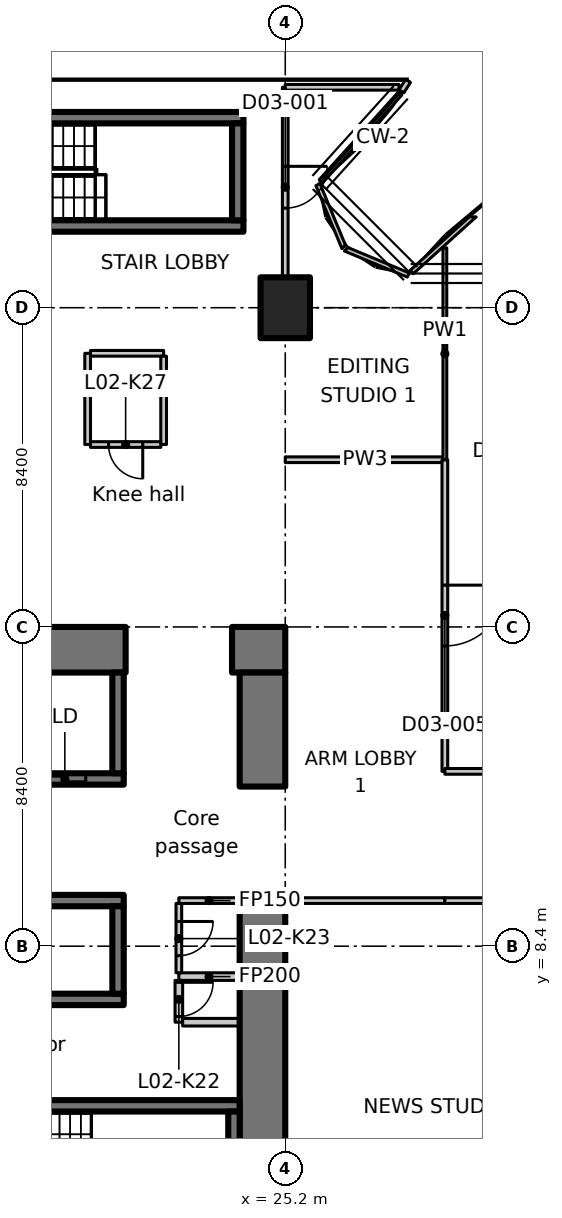
"""IFC4 building model, lengths in metres.
Left out: names, types, materials, properties, quantities, classifications, styles, units other than length and angle.
Written with IfcOpenShell. Run it as: python <this file> out.ifc"""

import sys

from ifc_helpers import new_model, si_unit, direction, frame, frame_2d, origin, origin_2d, place, context, subcontext, project, spatial, polyline, rectangle, outline, extrude, element, fill, save


model = new_model("IFC4")
c1 = context("Model", 3, precision=1e-05, world=origin(), true_north=direction((0.0, 1.0)))
c2 = subcontext(c1, "Body", "Model", "MODEL_VIEW")
j1 = project(units=[si_unit("LENGTHUNIT", "METRE"), si_unit("PLANEANGLEUNIT", "RADIAN")], contexts=[c1])
p1 = place(None, origin())
s1 = spatial("IfcSite", under=j1, at=p1, CompositionType="ELEMENT")
p2 = place(p1, origin())
s2 = spatial("IfcBuilding", under=s1, at=p2, CompositionType="ELEMENT")
p3 = place(p2, frame((0.0, 0.0, 12.5)))
s3 = spatial("IfcBuildingStorey", under=s2, at=p3, CompositionType="ELEMENT", Elevation=12.5)
p4 = place(p3, frame((25.2, 25.2, 0.0), z_axis=(0.0, 0.0, 1.0), x_axis=(1.0, 0.0, 0.0)))
e1 = element("IfcColumn", 1, at=p4, inside=s3, PredefinedType="COLUMN", context=c2, shape_type="SweptSolid", body=[
    extrude(rectangle(XDim=1.3, YDim=1.6, at=origin_2d()), origin(), (0.0, 0.0, 1.0), 7.25),
])
p5 = place(p2, origin())
s4 = spatial("IfcBuildingStorey", under=s2, at=p5, CompositionType="ELEMENT", Elevation=0.0)
p6 = place(p5, frame((17.4, 32.4, -6.3), z_axis=(0.0, 0.0, 1.0), x_axis=(1.0, 0.0, 0.0)))
e2 = element("IfcWall", 2, at=p6, inside=s4, PredefinedType="SOLIDWALL", context=c2, shape_type="SweptSolid", body=[
    extrude(rectangle(XDim=7.2, YDim=2.4, at=frame_2d((3.6, 0.0))), origin(), (0.0, 0.0, 1.0), 42.55),
])
p7 = place(p3, origin())
e3 = element("IfcWall", 3, at=p7, inside=s3, PredefinedType="SOLIDWALL", context=c2, shape_type="SweptSolid", body=[
    extrude(outline(polyline([(30.224, 27.59), (30.045, 27.59), (28.487, 26.182), (28.567, 26.093), (30.224, 27.59)])), origin(), (0.0, 0.0, 1.0), 7.5),
])
p8 = place(p3, origin())
e4 = element("IfcWall", 4, at=p8, inside=s3, PredefinedType="SOLIDWALL", context=c2, shape_type="SweptSolid", body=[
    extrude(outline(polyline([(28.412, 26.005), (28.458, 26.116), (26.847, 26.783), (26.755, 26.692), (28.412, 26.005)])), origin(), (0.0, 0.0, 1.0), 7.5),
])
p9 = place(p3, origin())
e5 = element("IfcWall", 5, at=p9, inside=s3, PredefinedType="SOLIDWALL", context=c2, shape_type="SweptSolid", body=[
    extrude(outline(polyline([(26.692, 26.755), (26.783, 26.847), (26.116, 28.458), (26.005, 28.412), (26.692, 26.755)])), origin(), (0.0, 0.0, 1.0), 7.5),
])
p10 = place(p3, origin())
e6 = element("IfcWall", 6, at=p10, inside=s3, PredefinedType="SOLIDWALL", context=c2, shape_type="SweptSolid", body=[
    extrude(outline(polyline([(26.093, 28.567), (26.182, 28.487), (28.267, 30.795), (28.167, 30.862), (26.093, 28.567)])), origin(), (0.0, 0.0, 1.0), 7.5),
])
p11 = place(p3, frame((-1.1, 16.2, 0.0), z_axis=(0.0, 0.0, 1.0), x_axis=(1.0, 0.0, 0.0)))
e7 = element("IfcWall", 7, at=p11, inside=s3, PredefinedType="SHEAR", context=c2, shape_type="SweptSolid", body=[
    extrude(rectangle(XDim=22.1, YDim=1.2, at=frame_2d((11.05, 0.0))), origin(), (0.0, 0.0, 1.0), 7.25),
])
p12 = place(p11, frame((3.15, 0.0, 0.0)))
e8 = element("IfcOpeningElement", 8, at=p12, cuts=e7, PredefinedType="OPENING", context=c2, shape_type="SweptSolid", body=[
    extrude(rectangle(XDim=1.1, YDim=2.3, at=frame_2d((0.55, 1.15))), frame((0.0, 0.61, 0.0), z_axis=(0.0, -1.0, 0.0), x_axis=(1.0, 0.0, 0.0)), (0.0, 0.0, 1.0), 1.22),
])
p13 = place(p3, frame((23.8, 16.2, 0.0), z_axis=(0.0, 0.0, 1.0), x_axis=(1.0, 0.0, 0.0)))
e9 = element("IfcWall", 9, at=p13, inside=s3, PredefinedType="SHEAR", context=c2, shape_type="SweptSolid", body=[
    extrude(rectangle(XDim=1.4, YDim=1.2, at=frame_2d((0.7, 0.0))), origin(), (0.0, 0.0, 1.0), 7.25),
])
p14 = place(p3, frame((24.6, 1.2, 0.0), z_axis=(0.0, 0.0, 1.0), x_axis=(0.0, 1.0, 0.0)))
e10 = element("IfcWall", 10, at=p14, inside=s3, PredefinedType="SHEAR", context=c2, shape_type="SweptSolid", body=[
    extrude(rectangle(XDim=8.6, YDim=1.2, at=frame_2d((4.3, 0.0))), origin(), (0.0, 0.0, 1.0), 7.25),
])
p15 = place(p3, frame((24.6, 12.6, 0.0), z_axis=(0.0, 0.0, 1.0), x_axis=(0.0, 1.0, 0.0)))
e11 = element("IfcWall", 11, at=p15, inside=s3, PredefinedType="SHEAR", context=c2, shape_type="SweptSolid", body=[
    extrude(rectangle(XDim=3.0, YDim=1.2, at=frame_2d((1.5, 0.0))), origin(), (0.0, 0.0, 1.0), 7.25),
])
p16 = place(p3, frame((1.2, 7.0, 0.0), z_axis=(0.0, 0.0, 1.0), x_axis=(1.0, 0.0, 0.0)))
e12 = element("IfcWall", 12, at=p16, inside=s3, PredefinedType="SHEAR", context=c2, shape_type="SweptSolid", body=[
    extrude(rectangle(XDim=19.75, YDim=0.3, at=frame_2d((9.875, 0.0))), origin(), (0.0, 0.0, 1.0), 7.25),
])
p17 = place(p3, frame((1.2, 9.6, 0.0), z_axis=(0.0, 0.0, 1.0), x_axis=(1.0, 0.0, 0.0)))
e13 = element("IfcWall", 13, at=p17, inside=s3, PredefinedType="SHEAR", context=c2, shape_type="SweptSolid", body=[
    extrude(rectangle(XDim=19.75, YDim=0.3, at=frame_2d((9.875, 0.0))), origin(), (0.0, 0.0, 1.0), 7.25),
])
p18 = place(p17, frame((0.85, 0.0, 0.0)))
e14 = element("IfcOpeningElement", 14, at=p18, cuts=e13, PredefinedType="OPENING", context=c2, shape_type="SweptSolid", body=[
    extrude(rectangle(XDim=1.1, YDim=2.3, at=frame_2d((0.55, 1.15))), frame((0.0, 0.16, 0.0), z_axis=(0.0, -1.0, 0.0), x_axis=(1.0, 0.0, 0.0)), (0.0, 0.0, 1.0), 0.32),
])
p19 = place(p17, frame((3.65, 0.0, 0.0)))
e15 = element("IfcOpeningElement", 15, at=p19, cuts=e13, PredefinedType="OPENING", context=c2, shape_type="SweptSolid", body=[
    extrude(rectangle(XDim=1.1, YDim=2.3, at=frame_2d((0.55, 1.15))), frame((0.0, 0.16, 0.0), z_axis=(0.0, -1.0, 0.0), x_axis=(1.0, 0.0, 0.0)), (0.0, 0.0, 1.0), 0.32),
])
p20 = place(p17, frame((6.45, 0.0, 0.0)))
e16 = element("IfcOpeningElement", 16, at=p20, cuts=e13, PredefinedType="OPENING", context=c2, shape_type="SweptSolid", body=[
    extrude(rectangle(XDim=1.1, YDim=2.3, at=frame_2d((0.55, 1.15))), frame((0.0, 0.16, 0.0), z_axis=(0.0, -1.0, 0.0), x_axis=(1.0, 0.0, 0.0)), (0.0, 0.0, 1.0), 0.32),
])
p21 = place(p17, frame((9.25, 0.0, 0.0)))
e17 = element("IfcOpeningElement", 17, at=p21, cuts=e13, PredefinedType="OPENING", context=c2, shape_type="SweptSolid", body=[
    extrude(rectangle(XDim=1.1, YDim=2.3, at=frame_2d((0.55, 1.15))), frame((0.0, 0.16, 0.0), z_axis=(0.0, -1.0, 0.0), x_axis=(1.0, 0.0, 0.0)), (0.0, 0.0, 1.0), 0.32),
])
p22 = place(p17, frame((12.05, 0.0, 0.0)))
e18 = element("IfcOpeningElement", 18, at=p22, cuts=e13, PredefinedType="OPENING", context=c2, shape_type="SweptSolid", body=[
    extrude(rectangle(XDim=1.1, YDim=2.3, at=frame_2d((0.55, 1.15))), frame((0.0, 0.16, 0.0), z_axis=(0.0, -1.0, 0.0), x_axis=(1.0, 0.0, 0.0)), (0.0, 0.0, 1.0), 0.32),
])
p23 = place(p17, frame((14.85, 0.0, 0.0)))
e19 = element("IfcOpeningElement", 19, at=p23, cuts=e13, PredefinedType="OPENING", context=c2, shape_type="SweptSolid", body=[
    extrude(rectangle(XDim=1.1, YDim=2.3, at=frame_2d((0.55, 1.15))), frame((0.0, 0.16, 0.0), z_axis=(0.0, -1.0, 0.0), x_axis=(1.0, 0.0, 0.0)), (0.0, 0.0, 1.0), 0.32),
])
p24 = place(p3, frame((20.8, 7.15, 0.0), z_axis=(0.0, 0.0, 1.0), x_axis=(0.0, 1.0, 0.0)))
e20 = element("IfcWall", 20, at=p24, inside=s3, PredefinedType="SHEAR", context=c2, shape_type="SweptSolid", body=[
    extrude(rectangle(XDim=2.3, YDim=0.3, at=frame_2d((1.15, 0.0))), origin(), (0.0, 0.0, 1.0), 7.25),
])
p25 = place(p3, frame((15.05, 12.8, 0.0), z_axis=(0.0, 0.0, 1.0), x_axis=(1.0, 0.0, 0.0)))
e21 = element("IfcWall", 21, at=p25, inside=s3, PredefinedType="SHEAR", context=c2, shape_type="SweptSolid", body=[
    extrude(rectangle(XDim=5.9, YDim=0.3, at=frame_2d((2.95, 0.0))), origin(), (0.0, 0.0, 1.0), 7.25),
])
p26 = place(p25, frame((3.8, 0.0, 0.0)))
e22 = element("IfcOpeningElement", 22, at=p26, cuts=e21, PredefinedType="OPENING", context=c2, shape_type="SweptSolid", body=[
    extrude(rectangle(XDim=1.1, YDim=2.3, at=frame_2d((0.55, 1.15))), frame((0.0, 0.16, 0.0), z_axis=(0.0, -1.0, 0.0), x_axis=(1.0, 0.0, 0.0)), (0.0, 0.0, 1.0), 0.32),
])
p27 = place(p3, frame((20.8, 12.95, 0.0), z_axis=(0.0, 0.0, 1.0), x_axis=(0.0, 1.0, 0.0)))
e23 = element("IfcWall", 23, at=p27, inside=s3, PredefinedType="SHEAR", context=c2, shape_type="SweptSolid", body=[
    extrude(rectangle(XDim=2.65, YDim=0.3, at=frame_2d((1.325, 0.0))), origin(), (0.0, 0.0, 1.0), 7.25),
])
p28 = place(p3, frame((15.8, 4.2, 0.0), z_axis=(0.0, 0.0, 1.0), x_axis=(1.0, 0.0, 0.0)))
e24 = element("IfcWall", 24, at=p28, inside=s3, PredefinedType="SHEAR", context=c2, shape_type="SweptSolid", body=[
    extrude(rectangle(XDim=8.2, YDim=0.3, at=frame_2d((4.1, 0.0))), origin(), (0.0, 0.0, 1.0), 7.25),
])
p29 = place(p28, frame((0.4, 0.0, 0.0)))
e25 = element("IfcOpeningElement", 25, at=p29, cuts=e24, PredefinedType="OPENING", context=c2, shape_type="SweptSolid", body=[
    extrude(rectangle(XDim=1.0, YDim=2.1, at=frame_2d((0.5, 1.05))), frame((0.0, 0.16, 0.0), z_axis=(0.0, -1.0, 0.0), x_axis=(1.0, 0.0, 0.0)), (0.0, 0.0, 1.0), 0.32),
])
p30 = place(p3, frame((23.85, 1.5, 0.0), z_axis=(0.0, 0.0, 1.0), x_axis=(0.0, 1.0, 0.0)))
e26 = element("IfcWall", 26, at=p30, inside=s3, PredefinedType="SHEAR", context=c2, shape_type="SweptSolid", body=[
    extrude(rectangle(XDim=2.55, YDim=0.3, at=frame_2d((1.275, 0.0))), origin(), (0.0, 0.0, 1.0), 7.25),
])
for number, where, z_axis, x_axis in (
    (27, (15.9, 27.35, 0.0), (0.0, 0.0, 1.0), (1.0, 0.0, 0.0)),
    (28, (15.9, 30.2, 0.0), (0.0, 0.0, 1.0), (1.0, 0.0, 0.0)),
):
    element("IfcWall", number, at=place(p3, frame(where, z_axis=z_axis, x_axis=x_axis)), inside=s3, PredefinedType="SHEAR", context=c2, shape_type="SweptSolid", body=[
        extrude(rectangle(XDim=8.2, YDim=0.3, at=frame_2d((4.1, 0.0))), origin(), (0.0, 0.0, 1.0), 7.25),
    ])
p31 = place(p3, frame((23.95, 27.5, 0.0), z_axis=(0.0, 0.0, 1.0), x_axis=(0.0, 1.0, 0.0)))
e29 = element("IfcWall", 29, at=p31, inside=s3, PredefinedType="SHEAR", context=c2, shape_type="SweptSolid", body=[
    extrude(rectangle(XDim=2.55, YDim=0.3, at=frame_2d((1.275, 0.0))), origin(), (0.0, 0.0, 1.0), 7.25),
])
p32 = place(p3, frame((23.988, 7.6, 0.0), z_axis=(0.0, 0.0, 1.0), x_axis=(-1.0, 0.0, 0.0)))
e30 = element("IfcWall", 30, at=p32, inside=s3, PredefinedType="PARTITIONING", context=c2, shape_type="SweptSolid", body=[
    extrude(rectangle(XDim=1.588, YDim=0.2, at=frame_2d((0.794, 0.0))), origin(), (0.0, 0.0, 1.0), 7.25),
])
p33 = place(p3, frame((22.4, 7.5, 0.0), z_axis=(0.0, 0.0, 1.0), x_axis=(0.0, -1.0, 0.0)))
e31 = element("IfcWall", 31, at=p33, inside=s3, PredefinedType="PARTITIONING", context=c2, shape_type="SweptSolid", body=[
    extrude(rectangle(XDim=1.1, YDim=0.2, at=frame_2d((0.55, 0.0))), origin(), (0.0, 0.0, 1.0), 7.25),
])
p34 = place(p33, frame((0.05, 0.0, 0.0)))
e32 = element("IfcOpeningElement", 32, at=p34, cuts=e31, PredefinedType="OPENING", context=c2, shape_type="SweptSolid", body=[
    extrude(rectangle(XDim=0.9, YDim=2.1, at=frame_2d((0.45, 1.05))), frame((0.0, 0.11, 0.0), z_axis=(0.0, -1.0, 0.0), x_axis=(1.0, 0.0, 0.0)), (0.0, 0.0, 1.0), 0.22),
])
p35 = place(p3, frame((22.5, 6.4, 0.0), z_axis=(0.0, 0.0, 1.0), x_axis=(1.0, 0.0, 0.0)))
e33 = element("IfcWall", 33, at=p35, inside=s3, PredefinedType="PARTITIONING", context=c2, shape_type="SweptSolid", body=[
    extrude(rectangle(XDim=1.488, YDim=0.2, at=frame_2d((0.744, 0.0))), origin(), (0.0, 0.0, 1.0), 7.25),
])
p36 = place(p3, frame((23.988, 9.6, 0.0), z_axis=(0.0, 0.0, 1.0), x_axis=(-1.0, 0.0, 0.0)))
e34 = element("IfcWall", 34, at=p36, inside=s3, PredefinedType="PARTITIONING", context=c2, shape_type="SweptSolid", body=[
    extrude(rectangle(XDim=1.588, YDim=0.15, at=frame_2d((0.794, 0.0))), origin(), (0.0, 0.0, 1.0), 7.25),
])
p37 = place(p3, frame((22.4, 9.525, 0.0), z_axis=(0.0, 0.0, 1.0), x_axis=(0.0, -1.0, 0.0)))
e35 = element("IfcWall", 35, at=p37, inside=s3, PredefinedType="PARTITIONING", context=c2, shape_type="SweptSolid", body=[
    extrude(rectangle(XDim=1.825, YDim=0.15, at=frame_2d((0.913, 0.0))), origin(), (0.0, 0.0, 1.0), 7.25),
])
p38 = place(p37, frame((0.475, 0.0, 0.0)))
e36 = element("IfcOpeningElement", 36, at=p38, cuts=e35, PredefinedType="OPENING", context=c2, shape_type="SweptSolid", body=[
    extrude(rectangle(XDim=0.9, YDim=2.1, at=frame_2d((0.45, 1.05))), frame((0.0, 0.085, 0.0), z_axis=(0.0, -1.0, 0.0), x_axis=(1.0, 0.0, 0.0)), (0.0, 0.0, 1.0), 0.17),
])
p39 = place(p3, frame((20.0, 21.6, 0.0), z_axis=(0.0, 0.0, 1.0), x_axis=(0.0, 1.0, 0.0)))
e37 = element("IfcWall", 37, at=p39, inside=s3, PredefinedType="PARTITIONING", context=c2, shape_type="SweptSolid", body=[
    extrude(rectangle(XDim=2.4, YDim=0.15, at=frame_2d((1.2, 0.0))), origin(), (0.0, 0.0, 1.0), 7.25),
])
p40 = place(p3, frame((20.075, 24.0, 0.0), z_axis=(0.0, 0.0, 1.0), x_axis=(1.0, 0.0, 0.0)))
e38 = element("IfcWall", 38, at=p40, inside=s3, PredefinedType="PARTITIONING", context=c2, shape_type="SweptSolid", body=[
    extrude(rectangle(XDim=1.925, YDim=0.15, at=frame_2d((0.962, 0.0))), origin(), (0.0, 0.0, 1.0), 7.25),
])
p41 = place(p3, frame((22.0, 23.925, 0.0), z_axis=(0.0, 0.0, 1.0), x_axis=(0.0, -1.0, 0.0)))
e39 = element("IfcWall", 39, at=p41, inside=s3, PredefinedType="PARTITIONING", context=c2, shape_type="SweptSolid", body=[
    extrude(rectangle(XDim=2.325, YDim=0.15, at=frame_2d((1.163, 0.0))), origin(), (0.0, 0.0, 1.0), 7.25),
])
p42 = place(p3, frame((21.925, 21.6, 0.0), z_axis=(0.0, 0.0, 1.0), x_axis=(-1.0, 0.0, 0.0)))
e40 = element("IfcWall", 40, at=p42, inside=s3, PredefinedType="PARTITIONING", context=c2, shape_type="SweptSolid", body=[
    extrude(rectangle(XDim=1.85, YDim=0.15, at=frame_2d((0.925, 0.0))), origin(), (0.0, 0.0, 1.0), 7.25),
])
p43 = place(p42, frame((0.475, 0.0, 0.0)))
e41 = element("IfcOpeningElement", 41, at=p43, cuts=e40, PredefinedType="OPENING", context=c2, shape_type="SweptSolid", body=[
    extrude(rectangle(XDim=0.9, YDim=2.1, at=frame_2d((0.45, 1.05))), frame((0.0, 0.085, 0.0), z_axis=(0.0, -1.0, 0.0), x_axis=(1.0, 0.0, 0.0)), (0.0, 0.0, 1.0), 0.17),
])
for number, where, z_axis, x_axis in (
    (42, (25.2, 21.2, 0.0), (0.0, 0.0, 1.0), (1.0, 0.0, 0.0)),
    (43, (29.4, 9.6, 0.0), (0.0, 0.0, 1.0), (-1.0, 0.0, 0.0)),
):
    element("IfcWall", number, at=place(p3, frame(where, z_axis=z_axis, x_axis=x_axis)), inside=s3, PredefinedType="PARTITIONING", context=c2, shape_type="SweptSolid", body=[
        extrude(rectangle(XDim=4.2, YDim=0.15, at=frame_2d((2.1, 0.0))), origin(), (0.0, 0.0, 1.0), 7.23),
    ])
p44 = place(p3, frame((29.4, 21.2, 0.0), z_axis=(0.0, 0.0, 1.0), x_axis=(0.0, -1.0, 0.0)))
e44 = element("IfcWall", 44, at=p44, inside=s3, PredefinedType="PARTITIONING", context=c2, shape_type="SweptSolid", body=[
    extrude(rectangle(XDim=8.2, YDim=0.15, at=frame_2d((4.1, 0.0))), origin(), (0.0, 0.0, 1.0), 7.23),
])
p45 = place(p44, frame((3.3, 0.0, 0.0)))
e45 = element("IfcOpeningElement", 45, at=p45, cuts=e44, PredefinedType="OPENING", context=c2, shape_type="SweptSolid", body=[
    extrude(rectangle(XDim=1.6, YDim=2.1, at=frame_2d((0.8, 1.05))), frame((0.0, 0.085, 0.0), z_axis=(0.0, -1.0, 0.0), x_axis=(1.0, 0.0, 0.0)), (0.0, 0.0, 1.0), 0.17),
])
p46 = place(p3, frame((29.4, 26.776, 0.0), z_axis=(0.0, 0.0, 1.0), x_axis=(0.0, -1.0, 0.0)))
e46 = element("IfcWall", 46, at=p46, inside=s3, PredefinedType="PARTITIONING", context=c2, shape_type="SweptSolid", body=[
    extrude(outline(polyline([(0.0, 0.0), (5.576, 0.0), (5.576, 7.23), (2.026, 7.23), (2.024, 6.88), (1.128, 6.88), (1.126, 7.23), (0.0, 7.23), (0.0, 0.0)])), frame((0.0, 0.05, 0.0), z_axis=(0.0, -1.0, 0.0), x_axis=(1.0, 0.0, 0.0)), (0.0, 0.0, 1.0), 0.1),
])
p47 = place(p3, frame((25.2, 31.0, 0.0), z_axis=(0.0, 0.0, 1.0), x_axis=(0.0, -1.0, 0.0)))
e47 = element("IfcWall", 47, at=p47, inside=s3, PredefinedType="PARTITIONING", context=c2, shape_type="SweptSolid", body=[
    extrude(rectangle(XDim=4.98, YDim=0.15, at=frame_2d((2.49, 0.0))), origin(), (0.0, 0.0, 1.0), 7.23),
])
p48 = place(p47, frame((2.08, 0.0, 0.0)))
e48 = element("IfcOpeningElement", 48, at=p48, cuts=e47, PredefinedType="OPENING", context=c2, shape_type="SweptSolid", body=[
    extrude(rectangle(XDim=1.1, YDim=2.1, at=frame_2d((0.55, 1.05))), frame((0.0, 0.085, 0.0), z_axis=(0.0, -1.0, 0.0), x_axis=(1.0, 0.0, 0.0)), (0.0, 0.0, 1.0), 0.17),
])
p49 = place(p3, frame((25.2, 31.0, 0.0), z_axis=(0.0, 0.0, 1.0), x_axis=(1.0, 0.0, 0.0)))
e49 = element("IfcWall", 49, at=p49, inside=s3, PredefinedType="PARTITIONING", context=c2, shape_type="SweptSolid", body=[
    extrude(rectangle(XDim=2.994, YDim=0.15, at=frame_2d((1.497, 0.0))), origin(), (0.0, 0.0, 1.0), 7.23),
])
p50 = place(p3, frame((28.432, 31.168, 0.0), z_axis=(0.0, 0.0, 1.0), x_axis=(-0.541288698077, -0.840836812547, 0.0)))
e50 = element("IfcWall", 50, at=p50, inside=s3, PredefinedType="PARTITIONING", context=c2, shape_type="SweptSolid", body=[
    extrude(rectangle(XDim=0.325, YDim=0.15, at=frame_2d((0.163, 0.0))), origin(), (0.0, 0.0, 1.0), 7.23),
])
p51 = place(p3, frame((33.6, 9.6, 0.0), z_axis=(0.0, 0.0, 1.0), x_axis=(-1.0, 0.0, 0.0)))
e51 = element("IfcWall", 51, at=p51, inside=s3, PredefinedType="PARTITIONING", context=c2, shape_type="SweptSolid", body=[
    extrude(rectangle(XDim=4.2, YDim=0.15, at=frame_2d((2.1, 0.0))), origin(), (0.0, 0.0, 1.0), 7.23),
])
p52 = place(p51, frame((1.2, 0.0, 0.0)))
e52 = element("IfcOpeningElement", 52, at=p52, cuts=e51, PredefinedType="OPENING", context=c2, shape_type="SweptSolid", body=[
    extrude(rectangle(XDim=1.6, YDim=2.1, at=frame_2d((0.8, 1.05))), frame((0.0, 0.085, 0.0), z_axis=(0.0, -1.0, 0.0), x_axis=(1.0, 0.0, 0.0)), (0.0, 0.0, 1.0), 0.17),
])
p53 = place(p3, frame((29.4, 13.0, 0.0), z_axis=(0.0, 0.0, 1.0), x_axis=(1.0, 0.0, 0.0)))
e53 = element("IfcWall", 53, at=p53, inside=s3, PredefinedType="PARTITIONING", context=c2, shape_type="SweptSolid", body=[
    extrude(rectangle(XDim=4.2, YDim=0.15, at=frame_2d((2.1, 0.0))), origin(), (0.0, 0.0, 1.0), 7.23),
])
p54 = place(p26, origin())
e54 = element("IfcDoor", 54, at=p54, inside=s3, OperationType="SLIDING_TO_LEFT", PredefinedType="DOOR", context=c2, shape_type="SweptSolid", body=[
    extrude(rectangle(XDim=1.1, YDim=2.3, at=frame_2d((0.55, 1.15))), frame((0.0, 0.025, 0.0), z_axis=(0.0, -1.0, 0.0), x_axis=(1.0, 0.0, 0.0)), (0.0, 0.0, 1.0), 0.05),
])
fill(e22, e54)
p55 = place(p34, origin())
e55 = element("IfcDoor", 55, at=p55, inside=s3, OperationType="SINGLE_SWING_RIGHT", PredefinedType="DOOR", context=c2, shape_type="SweptSolid", body=[
    extrude(rectangle(XDim=0.9, YDim=2.1, at=frame_2d((0.45, 1.05))), frame((0.0, 0.025, 0.0), z_axis=(0.0, -1.0, 0.0), x_axis=(1.0, 0.0, 0.0)), (0.0, 0.0, 1.0), 0.05),
])
fill(e32, e55)
p56 = place(p38, origin())
e56 = element("IfcDoor", 56, at=p56, inside=s3, OperationType="SINGLE_SWING_LEFT", PredefinedType="DOOR", context=c2, shape_type="SweptSolid", body=[
    extrude(rectangle(XDim=0.9, YDim=2.1, at=frame_2d((0.45, 1.05))), frame((0.0, 0.025, 0.0), z_axis=(0.0, -1.0, 0.0), x_axis=(1.0, 0.0, 0.0)), (0.0, 0.0, 1.0), 0.05),
])
fill(e36, e56)
p57 = place(p43, origin())
e57 = element("IfcDoor", 57, at=p57, inside=s3, OperationType="SINGLE_SWING_LEFT", PredefinedType="DOOR", context=c2, shape_type="SweptSolid", body=[
    extrude(rectangle(XDim=0.9, YDim=2.1, at=frame_2d((0.45, 1.05))), frame((0.0, 0.025, 0.0), z_axis=(0.0, -1.0, 0.0), x_axis=(1.0, 0.0, 0.0)), (0.0, 0.0, 1.0), 0.05),
])
fill(e41, e57)
p58 = place(p48, origin())
e58 = element("IfcDoor", 58, at=p58, inside=s3, OperationType="SINGLE_SWING_RIGHT", PredefinedType="DOOR", context=c2, shape_type="SweptSolid", body=[
    extrude(rectangle(XDim=1.1, YDim=2.1, at=frame_2d((0.55, 1.05))), frame((0.0, 0.025, 0.0), z_axis=(0.0, -1.0, 0.0), x_axis=(1.0, 0.0, 0.0)), (0.0, 0.0, 1.0), 0.05),
])
fill(e48, e58)
p59 = place(p45, origin())
e59 = element("IfcDoor", 59, at=p59, inside=s3, OperationType="DOUBLE_DOOR_SINGLE_SWING", PredefinedType="DOOR", context=c2, shape_type="SweptSolid", body=[
    extrude(rectangle(XDim=1.6, YDim=2.1, at=frame_2d((0.8, 1.05))), frame((0.0, 0.025, 0.0), z_axis=(0.0, -1.0, 0.0), x_axis=(1.0, 0.0, 0.0)), (0.0, 0.0, 1.0), 0.05),
])
fill(e45, e59)
save(model, sys.argv[1])
